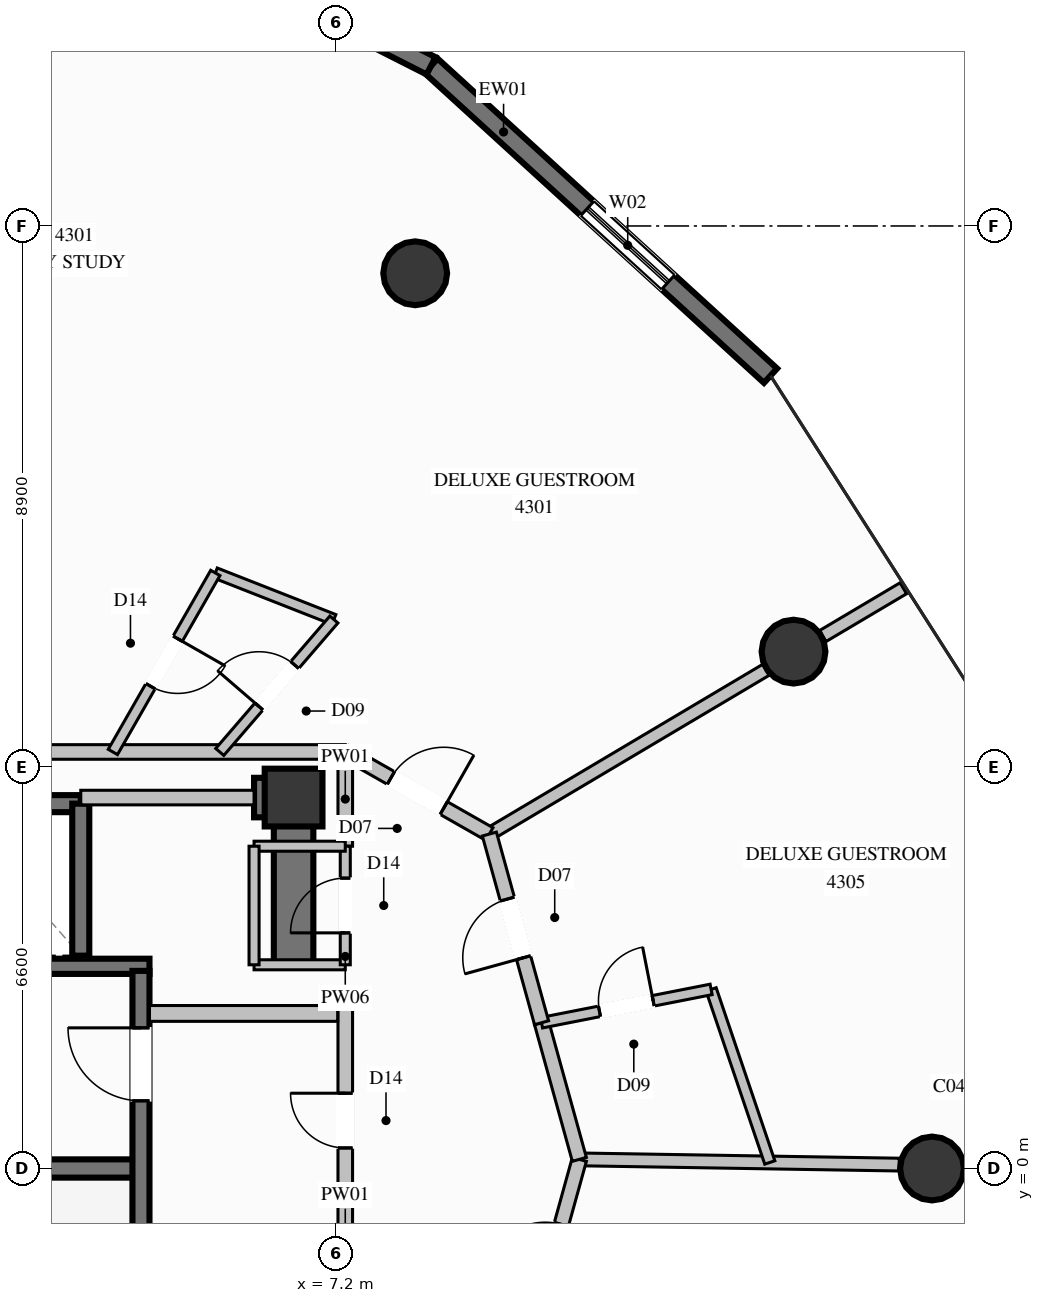
"""IFC4 building model, lengths in metres.
Left out: names, types, materials, properties, quantities, classifications, styles, units other than length and angle.
Written with IfcOpenShell. Run it as: python <this file> out.ifc"""

import sys

from ifc_helpers import new_model, si_unit, direction, frame, frame_2d, origin, origin_2d, place, context, subcontext, project, spatial, rectangle, circle, extrude, element, fill, save


model = new_model("IFC4")
c1 = context("Model", 3, precision=1e-05, world=origin(), true_north=direction((0.0, 1.0)))
c2 = subcontext(c1, "Body", "Model", "MODEL_VIEW")
j1 = project(units=[si_unit("LENGTHUNIT", "METRE"), si_unit("PLANEANGLEUNIT", "RADIAN")], contexts=[c1])
p1 = place(None, origin())
s1 = spatial("IfcSite", under=j1, at=p1, CompositionType="ELEMENT")
p2 = place(p1, origin())
s2 = spatial("IfcBuilding", under=s1, at=p2, CompositionType="ELEMENT")
p3 = place(p2, frame((0.0, 0.0, 160.2)))
s3 = spatial("IfcBuildingStorey", under=s2, at=p3, CompositionType="ELEMENT", Elevation=160.2)
p4 = place(p3, frame((6.5, 6.1, 0.0), z_axis=(0.0, 0.0, 1.0), x_axis=(1.0, 0.0, 0.0)))
e1 = element("IfcColumn", 1, at=p4, inside=s3, PredefinedType="COLUMN", context=c2, shape_type="SweptSolid", body=[
    extrude(rectangle(XDim=0.95, YDim=0.95, at=origin_2d()), origin(), (0.0, 0.0, 1.0), 3.6),
])
p5 = place(p3, frame((-3.99, 0.0, 0.0), z_axis=(0.0, 0.0, 1.0), x_axis=(1.0, 0.0, 0.0)))
e2 = element("IfcWall", 2, at=p5, inside=s3, PredefinedType="SHEAR", context=c2, shape_type="SweptSolid", body=[
    extrude(rectangle(XDim=7.98, YDim=0.3, at=frame_2d((3.99, 0.0))), origin(), (0.0, 0.0, 1.0), 3.6),
])
p6 = place(p3, frame((-4.13, 3.325, 0.0), z_axis=(0.0, 0.0, 1.0), x_axis=(1.0, 0.0, 0.0)))
e3 = element("IfcWall", 3, at=p6, inside=s3, PredefinedType="SOLIDWALL", context=c2, shape_type="SweptSolid", body=[
    extrude(rectangle(XDim=8.26, YDim=0.25, at=frame_2d((4.13, 0.0))), origin(), (0.0, 0.0, 1.0), 3.6),
])
p7 = place(p3, frame((5.85, 6.1, 0.0), z_axis=(0.0, 0.0, 1.0), x_axis=(1.0, 0.0, 0.0)))
e4 = element("IfcWall", 4, at=p7, inside=s3, PredefinedType="SHEAR", context=c2, shape_type="SweptSolid", body=[
    extrude(rectangle(XDim=0.325, YDim=0.65, at=frame_2d((0.163, 0.0))), origin(), (0.0, 0.0, 1.0), 3.6),
])
p8 = place(p3, frame((6.5, 3.35, 0.0), z_axis=(0.0, 0.0, 1.0), x_axis=(0.0, 1.0, 0.0)))
e5 = element("IfcWall", 5, at=p8, inside=s3, PredefinedType="SHEAR", context=c2, shape_type="SweptSolid", body=[
    extrude(rectangle(XDim=3.075, YDim=0.65, at=frame_2d((1.538, 0.0))), origin(), (0.0, 0.0, 1.0), 3.6),
])
for number, where, z_axis, x_axis in (
    (6, (17.0, 0.0, 0.0), (0.0, 0.0, 1.0), (1.0, 0.0, 0.0)),
    (7, (14.722, 8.5, 0.0), (0.0, 0.0, 1.0), (1.0, 0.0, 0.0)),
    (8, (8.5, 14.722, 0.0), (0.0, 0.0, 1.0), (1.0, 0.0, 0.0)),
):
    element("IfcColumn", number, at=place(p3, frame(where, z_axis=z_axis, x_axis=x_axis)), inside=s3, PredefinedType="COLUMN", context=c2, shape_type="SweptSolid", body=[
        extrude(circle(Radius=0.525, at=origin_2d()), origin(), (0.0, 0.0, 1.0), 3.6),
    ])
p9 = place(p3, frame((8.761, 18.134, 0.0), z_axis=(0.0, 0.0, 1.0), x_axis=(0.738589670995, -0.674155247624, 0.0)))
e9 = element("IfcWall", 9, at=p9, inside=s3, PredefinedType="SOLIDWALL", context=c2, shape_type="SweptSolid", body=[
    extrude(rectangle(XDim=7.559, YDim=0.32, at=frame_2d((3.78, 0.0))), origin(), (0.0, 0.0, 1.0), 3.2),
])
p10 = place(p9, frame((3.479, 0.0, 0.35)))
e10 = element("IfcOpeningElement", 10, at=p10, cuts=e9, PredefinedType="OPENING", context=c2, shape_type="SweptSolid", body=[
    extrude(rectangle(XDim=1.8, YDim=2.6, at=frame_2d((0.9, 1.3))), frame((0.0, 0.17, 0.0), z_axis=(0.0, -1.0, 0.0), x_axis=(1.0, 0.0, 0.0)), (0.0, 0.0, 1.0), 0.34),
])
p11 = place(p3, frame((2.208, 21.454, 0.0), z_axis=(0.0, 0.0, 1.0), x_axis=(0.892041671527, -0.451953157151, 0.0)))
e11 = element("IfcWall", 11, at=p11, inside=s3, PredefinedType="SOLIDWALL", context=c2, shape_type="SweptSolid", body=[
    extrude(rectangle(XDim=7.346, YDim=0.32, at=frame_2d((3.673, 0.0))), origin(), (0.0, 0.0, 1.0), 3.2),
])
p12 = place(p11, frame((2.773, 0.0, 0.35)))
e12 = element("IfcOpeningElement", 12, at=p12, cuts=e11, PredefinedType="OPENING", context=c2, shape_type="SweptSolid", body=[
    extrude(rectangle(XDim=1.8, YDim=2.6, at=frame_2d((0.9, 1.3))), frame((0.0, 0.17, 0.0), z_axis=(0.0, -1.0, 0.0), x_axis=(1.0, 0.0, 0.0)), (0.0, 0.0, 1.0), 0.34),
])
p13 = place(p3, frame((3.0, 6.0, 0.0), z_axis=(0.0, 0.0, 1.0), x_axis=(-1.0, 0.0, 0.0)))
e13 = element("IfcWall", 13, at=p13, inside=s3, PredefinedType="SOLIDWALL", context=c2, shape_type="SweptSolid", body=[
    extrude(rectangle(XDim=2.2, YDim=0.28, at=frame_2d((1.1, 0.0))), origin(), (0.0, 0.0, 1.0), 3.2),
])
p14 = place(p3, frame((3.0, 3.5, 0.0), z_axis=(0.0, 0.0, 1.0), x_axis=(0.0, 1.0, 0.0)))
e14 = element("IfcWall", 14, at=p14, inside=s3, PredefinedType="SOLIDWALL", context=c2, shape_type="SweptSolid", body=[
    extrude(rectangle(XDim=2.5, YDim=0.28, at=frame_2d((1.25, 0.0))), origin(), (0.0, 0.0, 1.0), 3.2),
])
p15 = place(p3, frame((3.99, -2.21, 0.0), z_axis=(0.0, 0.0, 1.0), x_axis=(0.0, 1.0, 0.0)))
e15 = element("IfcWall", 15, at=p15, inside=s3, PredefinedType="SOLIDWALL", context=c2, shape_type="SweptSolid", body=[
    extrude(rectangle(XDim=5.46, YDim=0.28, at=frame_2d((2.73, 0.0))), origin(), (0.0, 0.0, 1.0), 3.2),
])
p16 = place(p15, frame((3.323, 0.0, 0.0)))
e16 = element("IfcOpeningElement", 16, at=p16, cuts=e15, PredefinedType="OPENING", context=c2, shape_type="SweptSolid", body=[
    extrude(rectangle(XDim=1.2, YDim=2.2, at=frame_2d((0.6, 1.1))), frame((0.0, 0.15, 0.0), z_axis=(0.0, -1.0, 0.0), x_axis=(1.0, 0.0, 0.0)), (0.0, 0.0, 1.0), 0.3),
])
p17 = place(p3, frame((7.35, -2.34, 0.0), z_axis=(0.0, 0.0, 1.0), x_axis=(0.0, 1.0, 0.0)))
e17 = element("IfcWall", 17, at=p17, inside=s3, PredefinedType="PARTITIONING", context=c2, shape_type="SweptSolid", body=[
    extrude(rectangle(XDim=5.02, YDim=0.24, at=frame_2d((2.51, 0.0))), origin(), (0.0, 0.0, 1.0), 3.2),
])
p18 = place(p17, frame((2.678, 0.0, 0.0)))
e18 = element("IfcOpeningElement", 18, at=p18, cuts=e17, PredefinedType="OPENING", context=c2, shape_type="SweptSolid", body=[
    extrude(rectangle(XDim=0.9, YDim=2.02, at=frame_2d((0.45, 1.01))), frame((0.0, 0.13, 0.0), z_axis=(0.0, -1.0, 0.0), x_axis=(1.0, 0.0, 0.0)), (0.0, 0.0, 1.0), 0.26),
])
p19 = place(p3, frame((4.13, 2.55, 0.0), z_axis=(0.0, 0.0, 1.0), x_axis=(1.0, 0.0, 0.0)))
e19 = element("IfcWall", 19, at=p19, inside=s3, PredefinedType="PARTITIONING", context=c2, shape_type="SweptSolid", body=[
    extrude(rectangle(XDim=3.095, YDim=0.26, at=frame_2d((1.548, 0.0))), origin(), (0.0, 0.0, 1.0), 3.2),
])
p20 = place(p3, frame((-7.35, 6.85, 0.0), z_axis=(0.0, 0.0, 1.0), x_axis=(1.0, 0.0, 0.0)))
e20 = element("IfcWall", 20, at=p20, inside=s3, PredefinedType="PARTITIONING", context=c2, shape_type="SweptSolid", body=[
    extrude(rectangle(XDim=14.7, YDim=0.24, at=frame_2d((7.35, 0.0))), origin(), (0.0, 0.0, 1.0), 2.067),
])
p21 = place(p3, frame((7.35, 5.3, 0.0), z_axis=(0.0, 0.0, 1.0), x_axis=(0.0, 1.0, 0.0)))
e21 = element("IfcWall", 21, at=p21, inside=s3, PredefinedType="PARTITIONING", context=c2, shape_type="SweptSolid", body=[
    extrude(rectangle(XDim=1.55, YDim=0.24, at=frame_2d((0.775, 0.0))), origin(), (0.0, 0.0, 1.0), 3.2),
])
p22 = place(p3, frame((3.0, 6.1, 0.0), z_axis=(0.0, 0.0, 1.0), x_axis=(1.0, 0.0, 0.0)))
e22 = element("IfcWall", 22, at=p22, inside=s3, PredefinedType="PARTITIONING", context=c2, shape_type="SweptSolid", body=[
    extrude(rectangle(XDim=2.85, YDim=0.24, at=frame_2d((1.425, 0.0))), origin(), (0.0, 0.0, 1.0), 2.067),
])
p23 = place(p3, frame((5.85, 3.35, 0.0), z_axis=(0.0, 0.0, 1.0), x_axis=(1.0, 0.0, 0.0)))
e23 = element("IfcWall", 23, at=p23, inside=s3, PredefinedType="PARTITIONING", context=c2, shape_type="SweptSolid", body=[
    extrude(rectangle(XDim=1.5, YDim=0.165, at=frame_2d((0.75, 0.0))), origin(), (0.0, 0.0, 1.0), 3.2),
])
p24 = place(p3, frame((7.35, 3.35, 0.0), z_axis=(0.0, 0.0, 1.0), x_axis=(0.0, 1.0, 0.0)))
e24 = element("IfcWall", 24, at=p24, inside=s3, PredefinedType="PARTITIONING", context=c2, shape_type="SweptSolid", body=[
    extrude(rectangle(XDim=1.95, YDim=0.165, at=frame_2d((0.975, 0.0))), origin(), (0.0, 0.0, 1.0), 3.2),
])
p25 = place(p24, frame((0.525, 0.0, 0.0)))
e25 = element("IfcOpeningElement", 25, at=p25, cuts=e24, PredefinedType="OPENING", context=c2, shape_type="SweptSolid", body=[
    extrude(rectangle(XDim=0.9, YDim=2.02, at=frame_2d((0.45, 1.01))), frame((0.0, 0.093, 0.0), z_axis=(0.0, -1.0, 0.0), x_axis=(1.0, 0.0, 0.0)), (0.0, 0.0, 1.0), 0.185),
])
p26 = place(p3, frame((7.35, 5.3, 0.0), z_axis=(0.0, 0.0, 1.0), x_axis=(-1.0, 0.0, 0.0)))
e26 = element("IfcWall", 26, at=p26, inside=s3, PredefinedType="PARTITIONING", context=c2, shape_type="SweptSolid", body=[
    extrude(rectangle(XDim=1.5, YDim=0.165, at=frame_2d((0.75, 0.0))), origin(), (0.0, 0.0, 1.0), 3.2),
])
p27 = place(p3, frame((5.85, 5.3, 0.0), z_axis=(0.0, 0.0, 1.0), x_axis=(0.0, -1.0, 0.0)))
e27 = element("IfcWall", 27, at=p27, inside=s3, PredefinedType="PARTITIONING", context=c2, shape_type="SweptSolid", body=[
    extrude(rectangle(XDim=1.95, YDim=0.165, at=frame_2d((0.975, 0.0))), origin(), (0.0, 0.0, 1.0), 2.067),
])
p28 = place(p3, frame((11.2, 0.15, 0.0), z_axis=(0.0, 0.0, 1.0), x_axis=(0.999866513716, -0.016338749957, 0.0)))
e28 = element("IfcWall", 28, at=p28, inside=s3, PredefinedType="PARTITIONING", context=c2, shape_type="SweptSolid", body=[
    extrude(rectangle(XDim=5.26, YDim=0.21, at=frame_2d((2.63, 0.0))), origin(), (0.0, 0.0, 1.0), 2.067),
])
p29 = place(p3, frame((9.72, 5.5, 0.0), z_axis=(0.0, 0.0, 1.0), x_axis=(0.859846510469, 0.510552620632, 0.0)))
e29 = element("IfcWall", 29, at=p29, inside=s3, PredefinedType="PARTITIONING", context=c2, shape_type="SweptSolid", body=[
    extrude(rectangle(XDim=5.288, YDim=0.21, at=frame_2d((2.644, 0.0))), origin(), (0.0, 0.0, 1.0), 2.067),
])
p30 = place(p3, frame((15.203, 8.756, 0.0), z_axis=(0.0, 0.0, 1.0), x_axis=(0.860124178644, 0.510084696215, 0.0)))
e30 = element("IfcWall", 30, at=p30, inside=s3, PredefinedType="PARTITIONING", context=c2, shape_type="SweptSolid", body=[
    extrude(rectangle(XDim=1.541, YDim=0.21, at=frame_2d((0.771, 0.0))), origin(), (0.0, 0.0, 1.0), 3.2),
])
p31 = place(p3, frame((5.213, 9.794, 0.0), z_axis=(0.0, 0.0, 1.0), x_axis=(0.930796808483, -0.365537004033, 0.0)))
e31 = element("IfcWall", 31, at=p31, inside=s3, PredefinedType="PLUMBINGWALL", context=c2, shape_type="SweptSolid", body=[
    extrude(rectangle(XDim=2.095, YDim=0.175, at=frame_2d((1.048, 0.0))), origin(), (0.0, 0.0, 1.0), 3.2),
])
p32 = place(p3, frame((5.213, 9.794, 0.0), z_axis=(0.0, 0.0, 1.0), x_axis=(-0.496720187918, -0.867910741329, 0.0)))
e32 = element("IfcWall", 32, at=p32, inside=s3, PredefinedType="PLUMBINGWALL", context=c2, shape_type="SweptSolid", body=[
    extrude(rectangle(XDim=3.392, YDim=0.175, at=frame_2d((1.696, 0.0))), origin(), (0.0, 0.0, 1.0), 2.067),
])
p33 = place(p32, frame((1.246, 0.0, 0.0)))
e33 = element("IfcOpeningElement", 33, at=p33, cuts=e32, PredefinedType="OPENING", context=c2, shape_type="SweptSolid", body=[
    extrude(rectangle(XDim=0.9, YDim=2.02, at=frame_2d((0.45, 1.01))), frame((0.0, 0.098, 0.0), z_axis=(0.0, -1.0, 0.0), x_axis=(1.0, 0.0, 0.0)), (0.0, 0.0, 1.0), 0.195),
])
p34 = place(p3, frame((5.286, 6.85, 0.0), z_axis=(0.0, 0.0, 1.0), x_axis=(0.652865714491, 0.757473668745, 0.0)))
e34 = element("IfcWall", 34, at=p34, inside=s3, PredefinedType="PLUMBINGWALL", context=c2, shape_type="SweptSolid", body=[
    extrude(rectangle(XDim=2.875, YDim=0.175, at=frame_2d((1.438, 0.0))), origin(), (0.0, 0.0, 1.0), 3.2),
])
p35 = place(p34, frame((0.988, 0.0, 0.0)))
e35 = element("IfcOpeningElement", 35, at=p35, cuts=e34, PredefinedType="OPENING", context=c2, shape_type="SweptSolid", body=[
    extrude(rectangle(XDim=0.9, YDim=2.1, at=frame_2d((0.45, 1.05))), frame((0.0, 0.098, 0.0), z_axis=(0.0, -1.0, 0.0), x_axis=(1.0, 0.0, 0.0)), (0.0, 0.0, 1.0), 0.195),
])
p36 = place(p3, frame((7.35, 6.85, 0.0), z_axis=(0.0, 0.0, 1.0), x_axis=(0.868892391395, -0.495001022398, 0.0)))
e36 = element("IfcWall", 36, at=p36, inside=s3, PredefinedType="PARTITIONING", context=c2, shape_type="SweptSolid", body=[
    extrude(rectangle(XDim=2.728, YDim=0.24, at=frame_2d((1.364, 0.0))), origin(), (0.0, 0.0, 1.0), 3.2),
])
p37 = place(p36, frame((0.864, 0.0, 0.0)))
e37 = element("IfcOpeningElement", 37, at=p37, cuts=e36, PredefinedType="OPENING", context=c2, shape_type="SweptSolid", body=[
    extrude(rectangle(XDim=1.0, YDim=2.2, at=frame_2d((0.5, 1.1))), frame((0.0, 0.13, 0.0), z_axis=(0.0, -1.0, 0.0), x_axis=(1.0, 0.0, 0.0)), (0.0, 0.0, 1.0), 0.26),
])
p38 = place(p3, frame((10.342, -2.953, 0.0), z_axis=(0.0, 0.0, 1.0), x_axis=(0.266497617314, 0.963835577246, 0.0)))
e38 = element("IfcWall", 38, at=p38, inside=s3, PredefinedType="PARTITIONING", context=c2, shape_type="SweptSolid", body=[
    extrude(rectangle(XDim=3.219, YDim=0.24, at=frame_2d((1.61, 0.0))), origin(), (0.0, 0.0, 1.0), 3.2),
])
p39 = place(p38, frame((1.11, 0.0, 0.0)))
e39 = element("IfcOpeningElement", 39, at=p39, cuts=e38, PredefinedType="OPENING", context=c2, shape_type="SweptSolid", body=[
    extrude(rectangle(XDim=1.0, YDim=2.2, at=frame_2d((0.5, 1.1))), frame((0.0, 0.13, 0.0), z_axis=(0.0, -1.0, 0.0), x_axis=(1.0, 0.0, 0.0)), (0.0, 0.0, 1.0), 0.26),
])
p40 = place(p3, frame((11.2, 0.15, 0.0), z_axis=(0.0, 0.0, 1.0), x_axis=(-0.266801280383, 0.963751563831, 0.0)))
e40 = element("IfcWall", 40, at=p40, inside=s3, PredefinedType="PARTITIONING", context=c2, shape_type="SweptSolid", body=[
    extrude(rectangle(XDim=2.332, YDim=0.24, at=frame_2d((1.166, 0.0))), origin(), (0.0, 0.0, 1.0), 3.2),
])
p41 = place(p3, frame((14.332, 0.099, 0.0), z_axis=(0.0, 0.0, 1.0), x_axis=(-0.32114672857, 0.947029449769, 0.0)))
e41 = element("IfcWall", 41, at=p41, inside=s3, PredefinedType="PLUMBINGWALL", context=c2, shape_type="SweptSolid", body=[
    extrude(rectangle(XDim=3.005, YDim=0.175, at=frame_2d((1.502, 0.0))), origin(), (0.0, 0.0, 1.0), 3.2),
])
p42 = place(p3, frame((10.578, 2.397, 0.0), z_axis=(0.0, 0.0, 1.0), x_axis=(0.981232572148, 0.192828004593, 0.0)))
e42 = element("IfcWall", 42, at=p42, inside=s3, PredefinedType="PLUMBINGWALL", context=c2, shape_type="SweptSolid", body=[
    extrude(rectangle(XDim=2.842, YDim=0.175, at=frame_2d((1.421, 0.0))), origin(), (0.0, 0.0, 1.0), 3.2),
])
p43 = place(p42, frame((0.971, 0.0, 0.0)))
e43 = element("IfcOpeningElement", 43, at=p43, cuts=e42, PredefinedType="OPENING", context=c2, shape_type="SweptSolid", body=[
    extrude(rectangle(XDim=0.9, YDim=2.1, at=frame_2d((0.45, 1.05))), frame((0.0, 0.098, 0.0), z_axis=(0.0, -1.0, 0.0), x_axis=(1.0, 0.0, 0.0)), (0.0, 0.0, 1.0), 0.195),
])
p44 = place(p3, frame((10.578, 2.397, 0.0), z_axis=(0.0, 0.0, 1.0), x_axis=(-0.266478138733, 0.963840962803, 0.0)))
e44 = element("IfcWall", 44, at=p44, inside=s3, PredefinedType="PARTITIONING", context=c2, shape_type="SweptSolid", body=[
    extrude(rectangle(XDim=3.219, YDim=0.24, at=frame_2d((1.61, 0.0))), origin(), (0.0, 0.0, 1.0), 3.2),
])
p45 = place(p44, frame((1.11, 0.0, 0.0)))
e45 = element("IfcOpeningElement", 45, at=p45, cuts=e44, PredefinedType="OPENING", context=c2, shape_type="SweptSolid", body=[
    extrude(rectangle(XDim=1.0, YDim=2.2, at=frame_2d((0.5, 1.1))), frame((0.0, 0.13, 0.0), z_axis=(0.0, -1.0, 0.0), x_axis=(1.0, 0.0, 0.0)), (0.0, 0.0, 1.0), 0.26),
])
p46 = place(p10, origin())
e46 = element("IfcWindow", 46, at=p46, inside=s3, PartitioningType="SINGLE_PANEL", PredefinedType="WINDOW", context=c2, shape_type="SweptSolid", body=[
    extrude(rectangle(XDim=1.8, YDim=2.6, at=frame_2d((0.9, 1.3))), frame((0.0, 0.03, 0.0), z_axis=(0.0, -1.0, 0.0), x_axis=(1.0, 0.0, 0.0)), (0.0, 0.0, 1.0), 0.06),
])
fill(e10, e46)
p47 = place(p16, origin())
e47 = element("IfcDoor", 47, at=p47, inside=s3, OperationType="SINGLE_SWING_RIGHT", PredefinedType="DOOR", context=c2, shape_type="SweptSolid", body=[
    extrude(rectangle(XDim=1.2, YDim=2.2, at=frame_2d((0.6, 1.1))), frame((0.0, 0.025, 0.0), z_axis=(0.0, -1.0, 0.0), x_axis=(1.0, 0.0, 0.0)), (0.0, 0.0, 1.0), 0.05),
])
fill(e16, e47)
p48 = place(p18, origin())
e48 = element("IfcDoor", 48, at=p48, inside=s3, OperationType="SINGLE_SWING_RIGHT", PredefinedType="DOOR", context=c2, shape_type="SweptSolid", body=[
    extrude(rectangle(XDim=0.9, YDim=2.02, at=frame_2d((0.45, 1.01))), frame((0.0, 0.025, 0.0), z_axis=(0.0, -1.0, 0.0), x_axis=(1.0, 0.0, 0.0)), (0.0, 0.0, 1.0), 0.05),
])
fill(e18, e48)
p49 = place(p25, origin())
e49 = element("IfcDoor", 49, at=p49, inside=s3, OperationType="SINGLE_SWING_LEFT", PredefinedType="DOOR", context=c2, shape_type="SweptSolid", body=[
    extrude(rectangle(XDim=0.9, YDim=2.02, at=frame_2d((0.45, 1.01))), frame((0.0, 0.025, 0.0), z_axis=(0.0, -1.0, 0.0), x_axis=(1.0, 0.0, 0.0)), (0.0, 0.0, 1.0), 0.05),
])
fill(e25, e49)
p50 = place(p35, origin())
e50 = element("IfcDoor", 50, at=p50, inside=s3, OperationType="SINGLE_SWING_LEFT", PredefinedType="DOOR", context=c2, shape_type="SweptSolid", body=[
    extrude(rectangle(XDim=0.9, YDim=2.1, at=frame_2d((0.45, 1.05))), frame((0.0, 0.025, 0.0), z_axis=(0.0, -1.0, 0.0), x_axis=(1.0, 0.0, 0.0)), (0.0, 0.0, 1.0), 0.05),
])
fill(e35, e50)
p51 = place(p37, origin())
e51 = element("IfcDoor", 51, at=p51, inside=s3, OperationType="SINGLE_SWING_RIGHT", PredefinedType="DOOR", context=c2, shape_type="SweptSolid", body=[
    extrude(rectangle(XDim=1.0, YDim=2.2, at=frame_2d((0.5, 1.1))), frame((0.0, 0.025, 0.0), z_axis=(0.0, -1.0, 0.0), x_axis=(1.0, 0.0, 0.0)), (0.0, 0.0, 1.0), 0.05),
])
fill(e37, e51)
p52 = place(p33, origin())
e52 = element("IfcDoor", 52, at=p52, inside=s3, OperationType="SINGLE_SWING_LEFT", PredefinedType="DOOR", context=c2, shape_type="SweptSolid", body=[
    extrude(rectangle(XDim=0.9, YDim=2.02, at=frame_2d((0.45, 1.01))), frame((0.0, 0.025, 0.0), z_axis=(0.0, -1.0, 0.0), x_axis=(1.0, 0.0, 0.0)), (0.0, 0.0, 1.0), 0.05),
])
fill(e33, e52)
p53 = place(p43, origin())
e53 = element("IfcDoor", 53, at=p53, inside=s3, OperationType="SINGLE_SWING_RIGHT", PredefinedType="DOOR", context=c2, shape_type="SweptSolid", body=[
    extrude(rectangle(XDim=0.9, YDim=2.1, at=frame_2d((0.45, 1.05))), frame((0.0, 0.025, 0.0), z_axis=(0.0, -1.0, 0.0), x_axis=(1.0, 0.0, 0.0)), (0.0, 0.0, 1.0), 0.05),
])
fill(e43, e53)
p54 = place(p45, origin())
e54 = element("IfcDoor", 54, at=p54, inside=s3, OperationType="SINGLE_SWING_LEFT", PredefinedType="DOOR", context=c2, shape_type="SweptSolid", body=[
    extrude(rectangle(XDim=1.0, YDim=2.2, at=frame_2d((0.5, 1.1))), frame((0.0, 0.025, 0.0), z_axis=(0.0, -1.0, 0.0), x_axis=(1.0, 0.0, 0.0)), (0.0, 0.0, 1.0), 0.05),
])
fill(e45, e54)
save(model, sys.argv[1])
